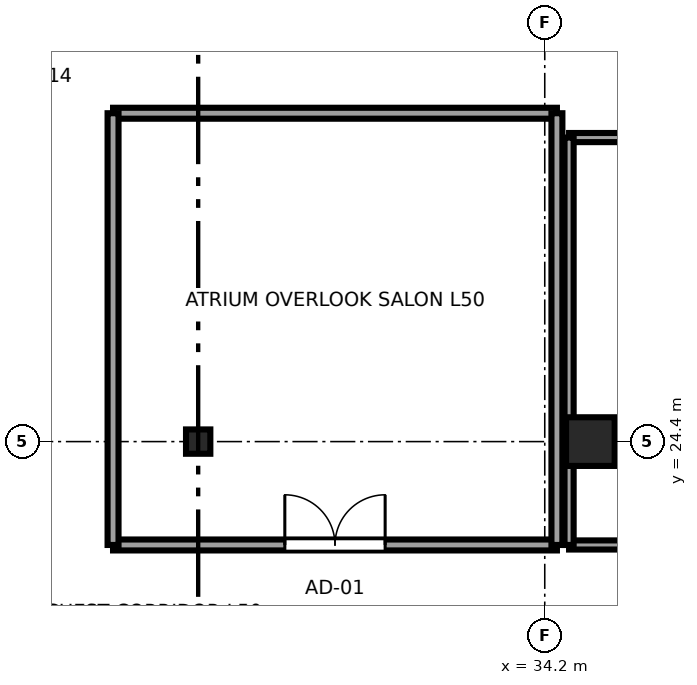
"""IFC4 building model, lengths in metres.
Left out: names, types, materials, properties, quantities, classifications, styles, units other than length and angle.
Written with IfcOpenShell. Run it as: python <this file> out.ifc"""

import sys

from ifc_helpers import new_model, si_unit, direction, frame, frame_2d, origin, origin_2d, place, context, subcontext, project, spatial, rectangle, i_section, extrude, source, transform, mapped, element, fill, save


model = new_model("IFC4")
c1 = context("Model", 3, precision=1e-05, world=origin(), true_north=direction((0.0, 1.0)))
c2 = subcontext(c1, "Body", "Model", "MODEL_VIEW")
j1 = project(units=[si_unit("LENGTHUNIT", "METRE"), si_unit("PLANEANGLEUNIT", "RADIAN")], contexts=[c1])
p1 = place(None, origin())
s1 = spatial("IfcSite", under=j1, at=p1, CompositionType="ELEMENT")
p2 = place(p1, origin())
s2 = spatial("IfcBuilding", under=s1, at=p2, CompositionType="ELEMENT")
p3 = place(p2, frame((0.0, 0.0, 191.1)))
s3 = spatial("IfcBuildingStorey", under=s2, at=p3, CompositionType="ELEMENT", Elevation=191.1)
m1 = source(origin(), c2, "Body", "SweptSolid", [
    extrude(rectangle(XDim=0.8, YDim=0.8, at=origin_2d()), origin(), (0.0, 0.0, 1.0), 3.55),
])
p4 = place(p3, frame((34.95, 24.4, 0.0), z_axis=(0.0, 0.0, 1.0), x_axis=(1.0, 0.0, 0.0)))
e1 = element("IfcColumn", 1, at=p4, inside=s3, PredefinedType="COLUMN", context=c2, shape_type="MappedRepresentation", body=[
    mapped(m1, transform((0.0, 0.0, 0.0), x_axis=(1.0, 0.0, 0.0), y_axis=(0.0, 1.0, 0.0), z_axis=(0.0, 0.0, 1.0), scale=1.0)),
])
m2 = source(origin(), c2, "Body", "SweptSolid", [
    extrude(i_section(OverallWidth=0.4, OverallDepth=0.4, WebThickness=0.02, FlangeThickness=0.035, at=origin_2d()), origin(), (0.0, 0.0, 1.0), 3.55),
])
p5 = place(p3, frame((28.5, 24.4, 0.0), z_axis=(0.0, 0.0, 1.0), x_axis=(1.0, 0.0, 0.0)))
e2 = element("IfcColumn", 2, at=p5, inside=s3, PredefinedType="COLUMN", context=c2, shape_type="MappedRepresentation", body=[
    mapped(m2, transform((0.0, 0.0, 0.0), x_axis=(1.0, 0.0, 0.0), y_axis=(0.0, 1.0, 0.0), z_axis=(0.0, 0.0, 1.0), scale=1.0)),
])
p6 = place(p3, frame((27.1, 22.7, 0.0), z_axis=(0.0, 0.0, 1.0), x_axis=(1.0, 0.0, 0.0)))
e3 = element("IfcWall", 3, at=p6, inside=s3, PredefinedType="PARTITIONING", context=c2, shape_type="SweptSolid", body=[
    extrude(rectangle(XDim=7.3, YDim=0.18, at=frame_2d((3.65, 0.0))), origin(), (0.0, 0.0, 1.0), 3.37),
])
p7 = place(p6, frame((2.825, 0.0, 0.0)))
e4 = element("IfcOpeningElement", 4, at=p7, cuts=e3, PredefinedType="OPENING", context=c2, shape_type="SweptSolid", body=[
    extrude(rectangle(XDim=1.65, YDim=2.15, at=frame_2d((0.825, 1.075))), frame((0.0, 0.1, 0.0), z_axis=(0.0, -1.0, 0.0), x_axis=(1.0, 0.0, 0.0)), (0.0, 0.0, 1.0), 0.2),
])
p8 = place(p3, frame((27.1, 29.8, 0.0), z_axis=(0.0, 0.0, 1.0), x_axis=(1.0, 0.0, 0.0)))
e5 = element("IfcWall", 5, at=p8, inside=s3, PredefinedType="PARTITIONING", context=c2, shape_type="SweptSolid", body=[
    extrude(rectangle(XDim=7.3, YDim=0.18, at=frame_2d((3.65, 0.0))), origin(), (0.0, 0.0, 1.0), 3.37),
])
for number, where, z_axis, x_axis in (
    (6, (27.1, 22.7, 0.0), (0.0, 0.0, 1.0), (0.0, 1.0, 0.0)),
    (7, (34.4, 22.7, 0.0), (0.0, 0.0, 1.0), (0.0, 1.0, 0.0)),
):
    element("IfcWall", number, at=place(p3, frame(where, z_axis=z_axis, x_axis=x_axis)), inside=s3, PredefinedType="PARTITIONING", context=c2, shape_type="SweptSolid", body=[
        extrude(rectangle(XDim=7.1, YDim=0.18, at=frame_2d((3.55, 0.0))), origin(), (0.0, 0.0, 1.0), 3.37),
    ])
p9 = place(p3, frame((34.6, 22.7, 0.0), z_axis=(0.0, 0.0, 1.0), x_axis=(1.0, 0.0, 0.0)))
e8 = element("IfcWall", 8, at=p9, inside=s3, PredefinedType="PARTITIONING", context=c2, shape_type="SweptSolid", body=[
    extrude(rectangle(XDim=7.5, YDim=0.15, at=frame_2d((3.75, 0.0))), origin(), (0.0, 0.0, 1.0), 3.37),
])
p10 = place(p9, frame((2.925, 0.0, 0.0)))
e9 = element("IfcOpeningElement", 9, at=p10, cuts=e8, PredefinedType="OPENING", context=c2, shape_type="SweptSolid", body=[
    extrude(rectangle(XDim=1.65, YDim=2.15, at=frame_2d((0.825, 1.075))), frame((0.0, 0.085, 0.0), z_axis=(0.0, -1.0, 0.0), x_axis=(1.0, 0.0, 0.0)), (0.0, 0.0, 1.0), 0.17),
])
p11 = place(p3, frame((34.6, 29.4, 0.0), z_axis=(0.0, 0.0, 1.0), x_axis=(1.0, 0.0, 0.0)))
e10 = element("IfcWall", 10, at=p11, inside=s3, PredefinedType="PARTITIONING", context=c2, shape_type="SweptSolid", body=[
    extrude(rectangle(XDim=7.5, YDim=0.15, at=frame_2d((3.75, 0.0))), origin(), (0.0, 0.0, 1.0), 3.37),
])
p12 = place(p3, frame((34.6, 22.7, 0.0), z_axis=(0.0, 0.0, 1.0), x_axis=(0.0, 1.0, 0.0)))
e11 = element("IfcWall", 11, at=p12, inside=s3, PredefinedType="PARTITIONING", context=c2, shape_type="SweptSolid", body=[
    extrude(rectangle(XDim=6.7, YDim=0.15, at=frame_2d((3.35, 0.0))), origin(), (0.0, 0.0, 1.0), 3.37),
])
m3 = source(origin(), c2, "Body", "SweptSolid", [
    extrude(rectangle(XDim=1.65, YDim=2.15, at=frame_2d((0.825, 1.075))), frame((0.0, 0.025, 0.0), z_axis=(0.0, -1.0, 0.0), x_axis=(1.0, 0.0, 0.0)), (0.0, 0.0, 1.0), 0.05),
])
p13 = place(p7, origin())
e12 = element("IfcDoor", 12, at=p13, inside=s3, OperationType="DOUBLE_DOOR_SINGLE_SWING", PredefinedType="DOOR", context=c2, shape_type="MappedRepresentation", body=[
    mapped(m3, transform((0.0, 0.0, 0.0), x_axis=(1.0, 0.0, 0.0), y_axis=(0.0, 1.0, 0.0), z_axis=(0.0, 0.0, 1.0), scale=1.0)),
])
fill(e4, e12)
save(model, sys.argv[1])
